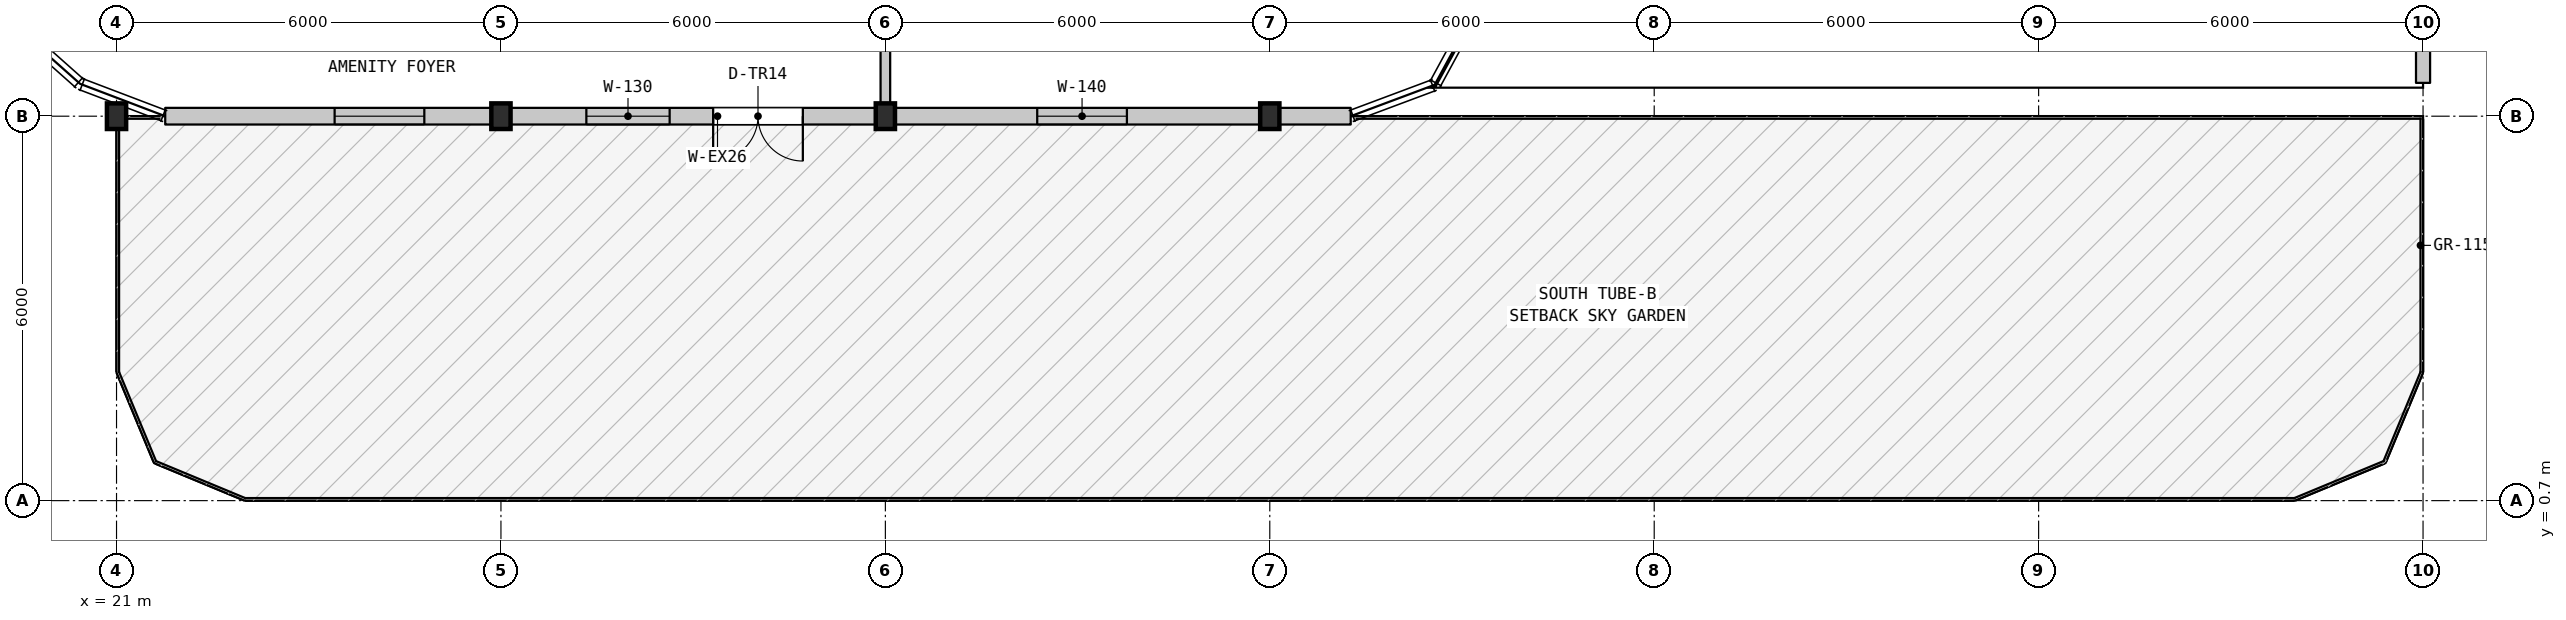
"""IFC4 building model, lengths in metres.
Left out: names, types, materials, properties, quantities, classifications, styles, units other than length and angle.
Written with IfcOpenShell. Run it as: python <this file> out.ifc"""

import sys

from ifc_helpers import new_model, si_unit, direction, frame, frame_2d, origin, origin_2d, place, context, subcontext, project, spatial, rectangle, i_section, extrude, element, fill, save


model = new_model("IFC4")
c1 = context("Model", 3, precision=1e-05, world=origin(), true_north=direction((0.0, 1.0)))
c2 = subcontext(c1, "Body", "Model", "MODEL_VIEW")
j1 = project(units=[si_unit("LENGTHUNIT", "METRE"), si_unit("PLANEANGLEUNIT", "RADIAN")], contexts=[c1])
p1 = place(None, origin())
s1 = spatial("IfcSite", under=j1, at=p1, CompositionType="ELEMENT")
p2 = place(p1, origin())
s2 = spatial("IfcBuilding", under=s1, at=p2, CompositionType="ELEMENT")
p3 = place(p2, frame((0.0, 0.0, 242.8)))
s3 = spatial("IfcBuildingStorey", under=s2, at=p3, CompositionType="ELEMENT", Elevation=242.8)
for number, where, z_axis, x_axis in (
    (1, (21.0, 6.7, 0.0), (0.0, 0.0, 1.0), (1.0, 0.0, 0.0)),
    (2, (27.0, 6.7, 0.0), (0.0, 0.0, 1.0), (1.0, 0.0, 0.0)),
    (3, (33.0, 6.7, 0.0), (0.0, 0.0, 1.0), (1.0, 0.0, 0.0)),
    (4, (39.0, 6.7, 0.0), (0.0, 0.0, 1.0), (1.0, 0.0, 0.0)),
):
    element("IfcColumn", number, at=place(p3, frame(where, z_axis=z_axis, x_axis=x_axis)), inside=s3, PredefinedType="COLUMN", context=c2, shape_type="SweptSolid", body=[
        extrude(i_section(OverallWidth=0.3, OverallDepth=0.4, WebThickness=0.013, FlangeThickness=0.024, FilletRadius=0.027, at=origin_2d()), origin(), (0.0, 0.0, 1.0), 4.5),
    ])
p4 = place(p3, frame((40.263, 6.7, 0.0), z_axis=(0.0, 0.0, 1.0), x_axis=(-1.0, 0.0, 0.0)))
e5 = element("IfcWall", 5, at=p4, inside=s3, PredefinedType="STANDARD", context=c2, shape_type="SweptSolid", body=[
    extrude(rectangle(XDim=1.263, YDim=0.26, at=frame_2d((0.631, 0.0))), origin(), (0.0, 0.0, 1.0), 4.19),
])
p5 = place(p3, frame((57.0, 25.9, 0.0), z_axis=(0.0, 0.0, 1.0), x_axis=(0.0, -1.0, 0.0)))
e6 = element("IfcWall", 6, at=p5, inside=s3, PredefinedType="PARAPET", context=c2, shape_type="SweptSolid", body=[
    extrude(rectangle(XDim=18.68, YDim=0.22, at=frame_2d((9.34, 0.0))), origin(), (0.0, 0.0, 1.0), 0.55),
])
p6 = place(p3, frame((33.0, 6.71, 0.0), z_axis=(0.0, 0.0, 1.0), x_axis=(0.0, 1.0, 0.0)))
e7 = element("IfcWall", 7, at=p6, inside=s3, PredefinedType="STANDARD", context=c2, shape_type="SweptSolid", body=[
    extrude(rectangle(XDim=19.19, YDim=0.15, at=frame_2d((9.595, 0.0))), origin(), (0.0, 0.0, 1.0), 3.9),
])
p7 = place(p3, frame((39.0, 6.7, 0.0), z_axis=(0.0, 0.0, 1.0), x_axis=(-1.0, 0.0, 0.0)))
e8 = element("IfcWall", 8, at=p7, inside=s3, PredefinedType="STANDARD", context=c2, shape_type="SweptSolid", body=[
    extrude(rectangle(XDim=17.24, YDim=0.26, at=frame_2d((8.62, 0.0))), origin(), (0.0, 0.0, 1.0), 3.84),
])
p8 = place(p7, frame((7.288, 0.0, 0.0)))
e9 = element("IfcOpeningElement", 9, at=p8, cuts=e8, PredefinedType="OPENING", context=c2, shape_type="SweptSolid", body=[
    extrude(rectangle(XDim=1.4, YDim=2.2, at=frame_2d((0.7, 1.1))), frame((0.0, 0.14, 0.0), z_axis=(0.0, -1.0, 0.0), x_axis=(1.0, 0.0, 0.0)), (0.0, 0.0, 1.0), 0.28),
])
p9 = place(p7, frame((2.23, 0.0, 0.9)))
e10 = element("IfcOpeningElement", 10, at=p9, cuts=e8, PredefinedType="OPENING", context=c2, shape_type="SweptSolid", body=[
    extrude(rectangle(XDim=1.4, YDim=1.85, at=frame_2d((0.7, 0.925))), frame((0.0, 0.14, 0.0), z_axis=(0.0, -1.0, 0.0), x_axis=(1.0, 0.0, 0.0)), (0.0, 0.0, 1.0), 0.28),
])
p10 = place(p7, frame((9.367, 0.0, 0.9)))
e11 = element("IfcOpeningElement", 11, at=p10, cuts=e8, PredefinedType="OPENING", context=c2, shape_type="SweptSolid", body=[
    extrude(rectangle(XDim=1.3, YDim=1.9, at=frame_2d((0.65, 0.95))), frame((0.0, 0.14, 0.0), z_axis=(0.0, -1.0, 0.0), x_axis=(1.0, 0.0, 0.0)), (0.0, 0.0, 1.0), 0.28),
])
p11 = place(p7, frame((13.196, 0.0, 0.9)))
e12 = element("IfcOpeningElement", 12, at=p11, cuts=e8, PredefinedType="OPENING", context=c2, shape_type="SweptSolid", body=[
    extrude(rectangle(XDim=1.4, YDim=1.85, at=frame_2d((0.7, 0.925))), frame((0.0, 0.14, 0.0), z_axis=(0.0, -1.0, 0.0), x_axis=(1.0, 0.0, 0.0)), (0.0, 0.0, 1.0), 0.28),
])
p12 = place(p8, origin())
e13 = element("IfcDoor", 13, at=p12, inside=s3, OperationType="DOUBLE_DOOR_SINGLE_SWING", PredefinedType="DOOR", context=c2, shape_type="SweptSolid", body=[
    extrude(rectangle(XDim=1.4, YDim=2.2, at=frame_2d((0.7, 1.1))), frame((0.0, 0.025, 0.0), z_axis=(0.0, -1.0, 0.0), x_axis=(1.0, 0.0, 0.0)), (0.0, 0.0, 1.0), 0.05),
])
fill(e9, e13)
p13 = place(p9, origin())
e14 = element("IfcWindow", 14, at=p13, inside=s3, PartitioningType="SINGLE_PANEL", PredefinedType="WINDOW", context=c2, shape_type="SweptSolid", body=[
    extrude(rectangle(XDim=1.4, YDim=1.85, at=frame_2d((0.7, 0.925))), frame((0.0, 0.03, 0.0), z_axis=(0.0, -1.0, 0.0), x_axis=(1.0, 0.0, 0.0)), (0.0, 0.0, 1.0), 0.06),
])
fill(e10, e14)
p14 = place(p10, origin())
e15 = element("IfcWindow", 15, at=p14, inside=s3, PartitioningType="SINGLE_PANEL", PredefinedType="WINDOW", context=c2, shape_type="SweptSolid", body=[
    extrude(rectangle(XDim=1.3, YDim=1.9, at=frame_2d((0.65, 0.95))), frame((0.0, 0.03, 0.0), z_axis=(0.0, -1.0, 0.0), x_axis=(1.0, 0.0, 0.0)), (0.0, 0.0, 1.0), 0.06),
])
fill(e11, e15)
p15 = place(p11, origin())
e16 = element("IfcWindow", 16, at=p15, inside=s3, PartitioningType="SINGLE_PANEL", PredefinedType="WINDOW", context=c2, shape_type="SweptSolid", body=[
    extrude(rectangle(XDim=1.4, YDim=1.85, at=frame_2d((0.7, 0.925))), frame((0.0, 0.03, 0.0), z_axis=(0.0, -1.0, 0.0), x_axis=(1.0, 0.0, 0.0)), (0.0, 0.0, 1.0), 0.06),
])
fill(e12, e16)
save(model, sys.argv[1])
